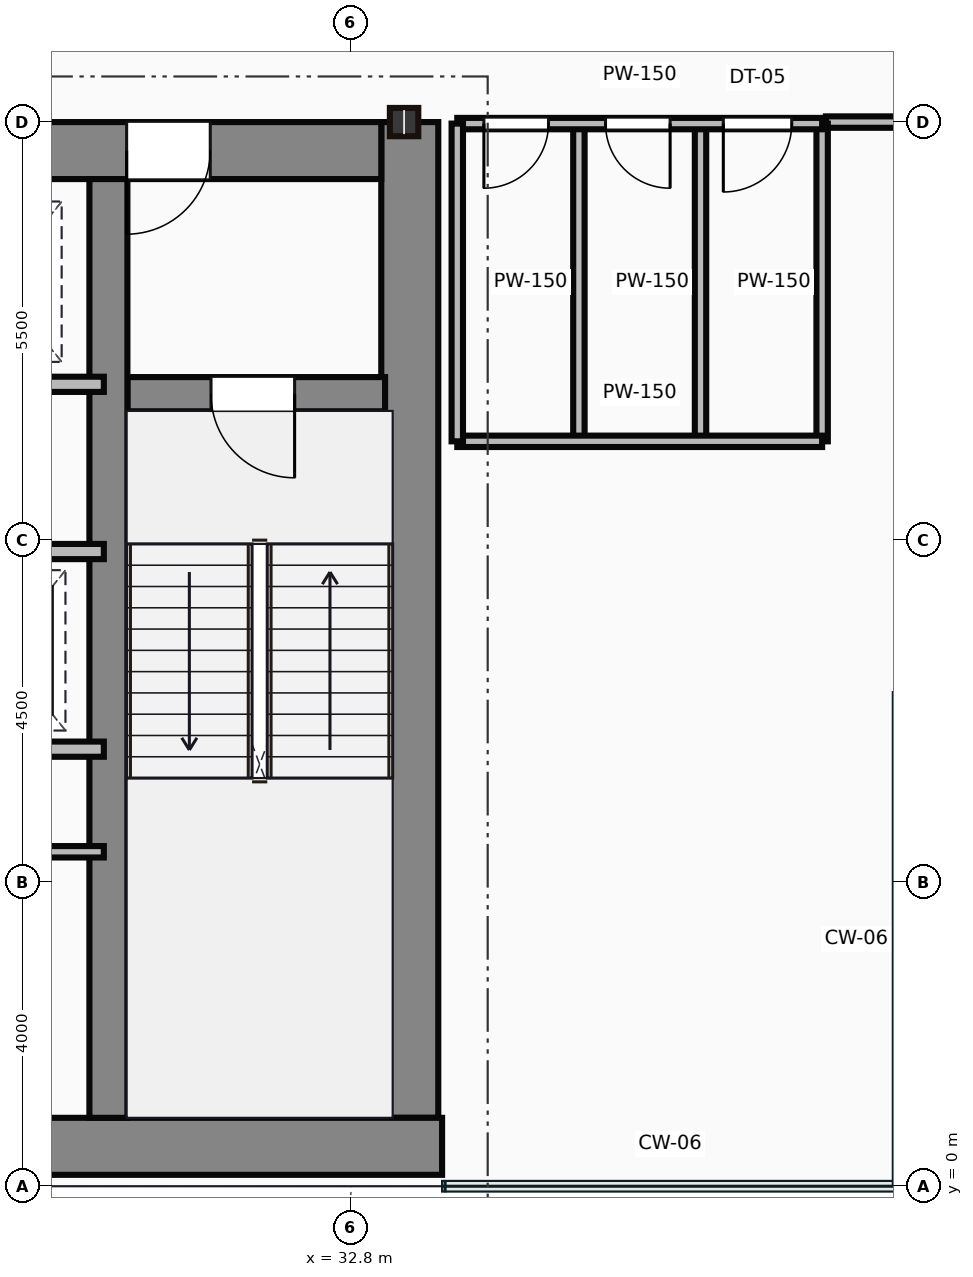
"""IFC4 building model, lengths in metres.
Left out: names, types, materials, properties, quantities, classifications, styles, units other than length and angle.
Written with IfcOpenShell. Run it as: python <this file> out.ifc"""

import sys

from ifc_helpers import new_model, si_unit, direction, frame, frame_2d, origin, origin_2d, place, context, subcontext, project, spatial, rectangle, i_section, extrude, source, transform, mapped, element, fill, save


model = new_model("IFC4")
c1 = context("Model", 3, precision=1e-05, world=origin(), true_north=direction((0.0, 1.0)))
c2 = subcontext(c1, "Body", "Model", "MODEL_VIEW")
j1 = project(units=[si_unit("LENGTHUNIT", "METRE"), si_unit("PLANEANGLEUNIT", "RADIAN")], contexts=[c1])
p1 = place(None, origin())
s1 = spatial("IfcSite", under=j1, at=p1, CompositionType="ELEMENT")
p2 = place(p1, origin())
s2 = spatial("IfcBuilding", under=s1, at=p2, CompositionType="ELEMENT")
p3 = place(p2, frame((0.0, 0.0, 184.4)))
s3 = spatial("IfcBuildingStorey", under=s2, at=p3, CompositionType="ELEMENT", Elevation=184.4)
m1 = source(origin(), c2, "Body", "SweptSolid", [
    extrude(rectangle(XDim=29.5, YDim=0.75, at=frame_2d((14.75, 0.0))), origin(), (0.0, 0.0, 1.0), 4.2),
])
p4 = place(p3, frame((4.5, 0.525, 0.0), z_axis=(0.0, 0.0, 1.0), x_axis=(1.0, 0.0, 0.0)))
e1 = element("IfcWall", 1, at=p4, inside=s3, PredefinedType="SHEAR", context=c2, shape_type="MappedRepresentation", body=[
    mapped(m1, transform((0.0, 0.0, 0.0))),
])
m2 = source(origin(), c2, "Body", "SweptSolid", [
    extrude(rectangle(XDim=13.1, YDim=0.75, at=frame_2d((6.55, 0.0))), origin(), (0.0, 0.0, 1.0), 4.2),
])
p5 = place(p3, frame((33.575, 0.9, 0.0), z_axis=(0.0, 0.0, 1.0), x_axis=(0.0, 1.0, 0.0)))
e2 = element("IfcWall", 2, at=p5, inside=s3, PredefinedType="SHEAR", context=c2, shape_type="MappedRepresentation", body=[
    mapped(m2, transform((0.0, 0.0, 0.0))),
])
m3 = source(origin(), c2, "Body", "SweptSolid", [
    extrude(rectangle(XDim=12.6, YDim=0.75, at=frame_2d((6.3, 0.0))), origin(), (0.0, 0.0, 1.0), 4.2),
])
p6 = place(p3, frame((20.6, 13.625, 0.0), z_axis=(0.0, 0.0, 1.0), x_axis=(1.0, 0.0, 0.0)))
e3 = element("IfcWall", 3, at=p6, inside=s3, PredefinedType="SHEAR", context=c2, shape_type="MappedRepresentation", body=[
    mapped(m3, transform((0.0, 0.0, 0.0))),
])
p7 = place(p6, frame((9.25, 0.0, 0.0)))
e4 = element("IfcOpeningElement", 4, at=p7, cuts=e3, PredefinedType="OPENING", context=c2, shape_type="SweptSolid", body=[
    extrude(rectangle(XDim=1.1, YDim=2.15, at=frame_2d((0.55, 1.075))), frame((0.0, 0.385, 0.0), z_axis=(0.0, -1.0, 0.0), x_axis=(1.0, 0.0, 0.0)), (0.0, 0.0, 1.0), 0.77),
])
m4 = source(origin(), c2, "Body", "SweptSolid", [
    extrude(rectangle(XDim=12.35, YDim=0.5, at=frame_2d((6.175, 0.0))), origin(), (0.0, 0.0, 1.0), 4.2),
])
p8 = place(p3, frame((29.61, 0.9, 0.0), z_axis=(0.0, 0.0, 1.0), x_axis=(0.0, 1.0, 0.0)))
e5 = element("IfcWall", 5, at=p8, inside=s3, PredefinedType="SHEAR", context=c2, shape_type="MappedRepresentation", body=[
    mapped(m4, transform((0.0, 0.0, 0.0))),
])
m5 = source(origin(), c2, "Body", "SweptSolid", [
    extrude(rectangle(XDim=3.39, YDim=0.45, at=frame_2d((1.695, 0.0))), origin(), (0.0, 0.0, 1.0), 4.2),
])
p9 = place(p3, frame((29.86, 10.42, 0.0), z_axis=(0.0, 0.0, 1.0), x_axis=(1.0, 0.0, 0.0)))
e6 = element("IfcWall", 6, at=p9, inside=s3, PredefinedType="SHEAR", context=c2, shape_type="MappedRepresentation", body=[
    mapped(m5, transform((0.0, 0.0, 0.0))),
])
p10 = place(p9, frame((1.1, 0.0, 0.0)))
e7 = element("IfcOpeningElement", 7, at=p10, cuts=e6, PredefinedType="OPENING", context=c2, shape_type="SweptSolid", body=[
    extrude(rectangle(XDim=1.1, YDim=2.15, at=frame_2d((0.55, 1.075))), frame((0.0, 0.235, 0.0), z_axis=(0.0, -1.0, 0.0), x_axis=(1.0, 0.0, 0.0)), (0.0, 0.0, 1.0), 0.47),
])
m6 = source(origin(), c2, "Body", "SweptSolid", [
    extrude(i_section(OverallWidth=0.374, OverallDepth=0.372, WebThickness=0.016, FlangeThickness=0.026, at=origin_2d()), origin(), (0.0, 0.0, 1.0), 4.2),
])
p11 = place(p3, frame((33.5, 14.0, 0.0), z_axis=(0.0, 0.0, 1.0), x_axis=(1.0, 0.0, 0.0)))
e8 = element("IfcColumn", 8, at=p11, inside=s3, PredefinedType="COLUMN", context=c2, shape_type="MappedRepresentation", body=[
    mapped(m6, transform((0.0, 0.0, 0.0))),
])
m7 = source(origin(), c2, "Body", "SweptSolid", [
    extrude(rectangle(XDim=8.8, YDim=0.2, at=frame_2d((4.4, 0.0))), origin(), (0.0, 0.0, 1.0), 3.95),
])
p12 = place(p3, frame((20.75, 10.55, 0.0), z_axis=(0.0, 0.0, 1.0), x_axis=(1.0, 0.0, 0.0)))
e9 = element("IfcWall", 9, at=p12, inside=s3, PredefinedType="PARTITIONING", context=c2, shape_type="MappedRepresentation", body=[
    mapped(m7, transform((0.0, 0.0, 0.0))),
])
p13 = place(p12, frame((0.5, 0.0, 0.0)))
e10 = element("IfcOpeningElement", 10, at=p13, cuts=e9, PredefinedType="OPENING", context=c2, shape_type="SweptSolid", body=[
    extrude(rectangle(XDim=1.05, YDim=2.15, at=frame_2d((0.525, 1.075))), frame((0.0, 0.11, 0.0), z_axis=(0.0, -1.0, 0.0), x_axis=(1.0, 0.0, 0.0)), (0.0, 0.0, 1.0), 0.22),
])
p14 = place(p12, frame((2.6, 0.0, 0.0)))
e11 = element("IfcOpeningElement", 11, at=p14, cuts=e9, PredefinedType="OPENING", context=c2, shape_type="SweptSolid", body=[
    extrude(rectangle(XDim=1.05, YDim=2.15, at=frame_2d((0.525, 1.075))), frame((0.0, 0.11, 0.0), z_axis=(0.0, -1.0, 0.0), x_axis=(1.0, 0.0, 0.0)), (0.0, 0.0, 1.0), 0.22),
])
p15 = place(p12, frame((4.7, 0.0, 0.0)))
e12 = element("IfcOpeningElement", 12, at=p15, cuts=e9, PredefinedType="OPENING", context=c2, shape_type="SweptSolid", body=[
    extrude(rectangle(XDim=1.05, YDim=2.15, at=frame_2d((0.525, 1.075))), frame((0.0, 0.11, 0.0), z_axis=(0.0, -1.0, 0.0), x_axis=(1.0, 0.0, 0.0)), (0.0, 0.0, 1.0), 0.22),
])
p16 = place(p12, frame((6.8, 0.0, 0.0)))
e13 = element("IfcOpeningElement", 13, at=p16, cuts=e9, PredefinedType="OPENING", context=c2, shape_type="SweptSolid", body=[
    extrude(rectangle(XDim=1.05, YDim=2.15, at=frame_2d((0.525, 1.075))), frame((0.0, 0.11, 0.0), z_axis=(0.0, -1.0, 0.0), x_axis=(1.0, 0.0, 0.0)), (0.0, 0.0, 1.0), 0.22),
])
m8 = source(origin(), c2, "Body", "SweptSolid", [
    extrude(rectangle(XDim=4.55, YDim=0.2, at=frame_2d((2.275, 0.0))), origin(), (0.0, 0.0, 1.0), 3.95),
])
p17 = place(p3, frame((25.0, 8.35, 0.0), z_axis=(0.0, 0.0, 1.0), x_axis=(1.0, 0.0, 0.0)))
e14 = element("IfcWall", 14, at=p17, inside=s3, PredefinedType="PARTITIONING", context=c2, shape_type="MappedRepresentation", body=[
    mapped(m8, transform((0.0, 0.0, 0.0))),
])
p18 = place(p17, frame((0.5, 0.0, 0.0)))
e15 = element("IfcOpeningElement", 15, at=p18, cuts=e14, PredefinedType="OPENING", context=c2, shape_type="SweptSolid", body=[
    extrude(rectangle(XDim=1.05, YDim=2.15, at=frame_2d((0.525, 1.075))), frame((0.0, 0.11, 0.0), z_axis=(0.0, -1.0, 0.0), x_axis=(1.0, 0.0, 0.0)), (0.0, 0.0, 1.0), 0.22),
])
p19 = place(p17, frame((2.6, 0.0, 0.0)))
e16 = element("IfcOpeningElement", 16, at=p19, cuts=e14, PredefinedType="OPENING", context=c2, shape_type="SweptSolid", body=[
    extrude(rectangle(XDim=1.05, YDim=2.15, at=frame_2d((0.525, 1.075))), frame((0.0, 0.11, 0.0), z_axis=(0.0, -1.0, 0.0), x_axis=(1.0, 0.0, 0.0)), (0.0, 0.0, 1.0), 0.22),
])
p20 = place(p3, frame((25.0, 5.75, 0.0), z_axis=(0.0, 0.0, 1.0), x_axis=(1.0, 0.0, 0.0)))
e17 = element("IfcWall", 17, at=p20, inside=s3, PredefinedType="PARTITIONING", context=c2, shape_type="MappedRepresentation", body=[
    mapped(m8, transform((0.0, 0.0, 0.0))),
])
m9 = source(origin(), c2, "Body", "SweptSolid", [
    extrude(rectangle(XDim=4.55, YDim=0.15, at=frame_2d((2.275, 0.0))), origin(), (0.0, 0.0, 1.0), 3.95),
])
p21 = place(p3, frame((25.0, 4.4, 0.0), z_axis=(0.0, 0.0, 1.0), x_axis=(1.0, 0.0, 0.0)))
e18 = element("IfcWall", 18, at=p21, inside=s3, PredefinedType="PARTITIONING", context=c2, shape_type="MappedRepresentation", body=[
    mapped(m9, transform((0.0, 0.0, 0.0))),
])
m10 = source(origin(), c2, "Body", "SweptSolid", [
    extrude(rectangle(XDim=4.8, YDim=0.15, at=frame_2d((2.4, 0.0))), origin(), (0.0, 0.0, 1.0), 2.895),
])
p22 = place(p3, frame((34.2, 13.98, 0.0), z_axis=(0.0, 0.0, 1.0), x_axis=(1.0, 0.0, 0.0)))
e19 = element("IfcWall", 19, at=p22, inside=s3, PredefinedType="PARTITIONING", context=c2, shape_type="MappedRepresentation", body=[
    mapped(m10, transform((0.0, 0.0, 0.0))),
])
p23 = place(p22, frame((0.35, 0.0, 0.0)))
e20 = element("IfcOpeningElement", 20, at=p23, cuts=e19, PredefinedType="OPENING", context=c2, shape_type="SweptSolid", body=[
    extrude(rectangle(XDim=0.85, YDim=2.1, at=frame_2d((0.425, 1.05))), frame((0.0, 0.085, 0.0), z_axis=(0.0, -1.0, 0.0), x_axis=(1.0, 0.0, 0.0)), (0.0, 0.0, 1.0), 0.17),
])
p24 = place(p22, frame((1.95, 0.0, 0.0)))
e21 = element("IfcOpeningElement", 21, at=p24, cuts=e19, PredefinedType="OPENING", context=c2, shape_type="SweptSolid", body=[
    extrude(rectangle(XDim=0.85, YDim=2.1, at=frame_2d((0.425, 1.05))), frame((0.0, 0.085, 0.0), z_axis=(0.0, -1.0, 0.0), x_axis=(1.0, 0.0, 0.0)), (0.0, 0.0, 1.0), 0.17),
])
p25 = place(p22, frame((3.5, 0.0, 0.0)))
e22 = element("IfcOpeningElement", 22, at=p25, cuts=e19, PredefinedType="OPENING", context=c2, shape_type="SweptSolid", body=[
    extrude(rectangle(XDim=0.9, YDim=2.1, at=frame_2d((0.45, 1.05))), frame((0.0, 0.085, 0.0), z_axis=(0.0, -1.0, 0.0), x_axis=(1.0, 0.0, 0.0)), (0.0, 0.0, 1.0), 0.17),
])
m11 = source(origin(), c2, "Body", "SweptSolid", [
    extrude(rectangle(XDim=4.8, YDim=0.15, at=frame_2d((2.4, 0.0))), origin(), (0.0, 0.0, 1.0), 3.95),
])
p26 = place(p3, frame((34.2, 9.8, 0.0), z_axis=(0.0, 0.0, 1.0), x_axis=(1.0, 0.0, 0.0)))
e23 = element("IfcWall", 23, at=p26, inside=s3, PredefinedType="PARTITIONING", context=c2, shape_type="MappedRepresentation", body=[
    mapped(m11, transform((0.0, 0.0, 0.0))),
])
m12 = source(origin(), c2, "Body", "SweptSolid", [
    extrude(rectangle(XDim=4.18, YDim=0.15, at=frame_2d((2.09, 0.0))), origin(), (0.0, 0.0, 1.0), 3.95),
])
for number, where, z_axis, x_axis in (
    (24, (39.0, 9.8, 0.0), (0.0, 0.0, 1.0), (0.0, 1.0, 0.0)),
    (25, (34.2, 9.8, 0.0), (0.0, 0.0, 1.0), (0.0, 1.0, 0.0)),
    (26, (35.8, 9.8, 0.0), (0.0, 0.0, 1.0), (0.0, 1.0, 0.0)),
    (27, (37.4, 9.8, 0.0), (0.0, 0.0, 1.0), (0.0, 1.0, 0.0)),
):
    element("IfcWall", number, at=place(p3, frame(where, z_axis=z_axis, x_axis=x_axis)), inside=s3, PredefinedType="PARTITIONING", context=c2, shape_type="MappedRepresentation", body=[
        mapped(m12, transform((0.0, 0.0, 0.0))),
    ])
m13 = source(origin(), c2, "Body", "SweptSolid", [
    extrude(rectangle(XDim=1.75, YDim=0.15, at=frame_2d((0.875, 0.0))), origin(), (0.0, 0.0, 1.0), 2.895),
])
p27 = place(p3, frame((40.8, 14.0, 0.0), z_axis=(0.0, 0.0, 1.0), x_axis=(-1.0, 0.0, 0.0)))
e28 = element("IfcWall", 28, at=p27, inside=s3, PredefinedType="PARTITIONING", context=c2, shape_type="MappedRepresentation", body=[
    mapped(m13, transform((0.0, 0.0, 0.0))),
])
m14 = source(origin(), c2, "Body", "SweptSolid", [
    extrude(rectangle(XDim=1.1, YDim=2.15, at=frame_2d((0.55, 1.075))), frame((0.0, 0.025, 0.0), z_axis=(0.0, -1.0, 0.0), x_axis=(1.0, 0.0, 0.0)), (0.0, 0.0, 1.0), 0.05),
])
p28 = place(p10, frame((1.1, 0.0, 0.0), z_axis=(0.0, 0.0, 1.0), x_axis=(-1.0, 0.0, 0.0)))
e29 = element("IfcDoor", 29, at=p28, inside=s3, OperationType="SINGLE_SWING_RIGHT", PredefinedType="DOOR", context=c2, shape_type="MappedRepresentation", body=[
    mapped(m14, transform((0.0, 0.0, 0.0))),
])
fill(e7, e29)
p29 = place(p7, origin())
e30 = element("IfcDoor", 30, at=p29, inside=s3, OperationType="SINGLE_SWING_LEFT", PredefinedType="DOOR", context=c2, shape_type="MappedRepresentation", body=[
    mapped(m14, transform((0.0, 0.0, 0.0))),
])
fill(e4, e30)
m15 = source(origin(), c2, "Body", "SweptSolid", [
    extrude(rectangle(XDim=0.85, YDim=2.1, at=frame_2d((0.425, 1.05))), frame((0.0, 0.025, 0.0), z_axis=(0.0, -1.0, 0.0), x_axis=(1.0, 0.0, 0.0)), (0.0, 0.0, 1.0), 0.05),
])
p30 = place(p23, frame((0.85, 0.0, 0.0), z_axis=(0.0, 0.0, 1.0), x_axis=(-1.0, 0.0, 0.0)))
e31 = element("IfcDoor", 31, at=p30, inside=s3, OperationType="SINGLE_SWING_LEFT", PredefinedType="DOOR", context=c2, shape_type="MappedRepresentation", body=[
    mapped(m15, transform((0.0, 0.0, 0.0))),
])
fill(e20, e31)
p31 = place(p24, frame((0.85, 0.0, 0.0), z_axis=(0.0, 0.0, 1.0), x_axis=(-1.0, 0.0, 0.0)))
e32 = element("IfcDoor", 32, at=p31, inside=s3, OperationType="SINGLE_SWING_RIGHT", PredefinedType="DOOR", context=c2, shape_type="MappedRepresentation", body=[
    mapped(m15, transform((0.0, 0.0, 0.0))),
])
fill(e21, e32)
m16 = source(origin(), c2, "Body", "SweptSolid", [
    extrude(rectangle(XDim=0.9, YDim=2.1, at=frame_2d((0.45, 1.05))), frame((0.0, 0.025, 0.0), z_axis=(0.0, -1.0, 0.0), x_axis=(1.0, 0.0, 0.0)), (0.0, 0.0, 1.0), 0.05),
])
p32 = place(p25, frame((0.9, 0.0, 0.0), z_axis=(0.0, 0.0, 1.0), x_axis=(-1.0, 0.0, 0.0)))
e33 = element("IfcDoor", 33, at=p32, inside=s3, OperationType="SINGLE_SWING_LEFT", PredefinedType="DOOR", context=c2, shape_type="MappedRepresentation", body=[
    mapped(m16, transform((0.0, 0.0, 0.0))),
])
fill(e22, e33)
save(model, sys.argv[1])
